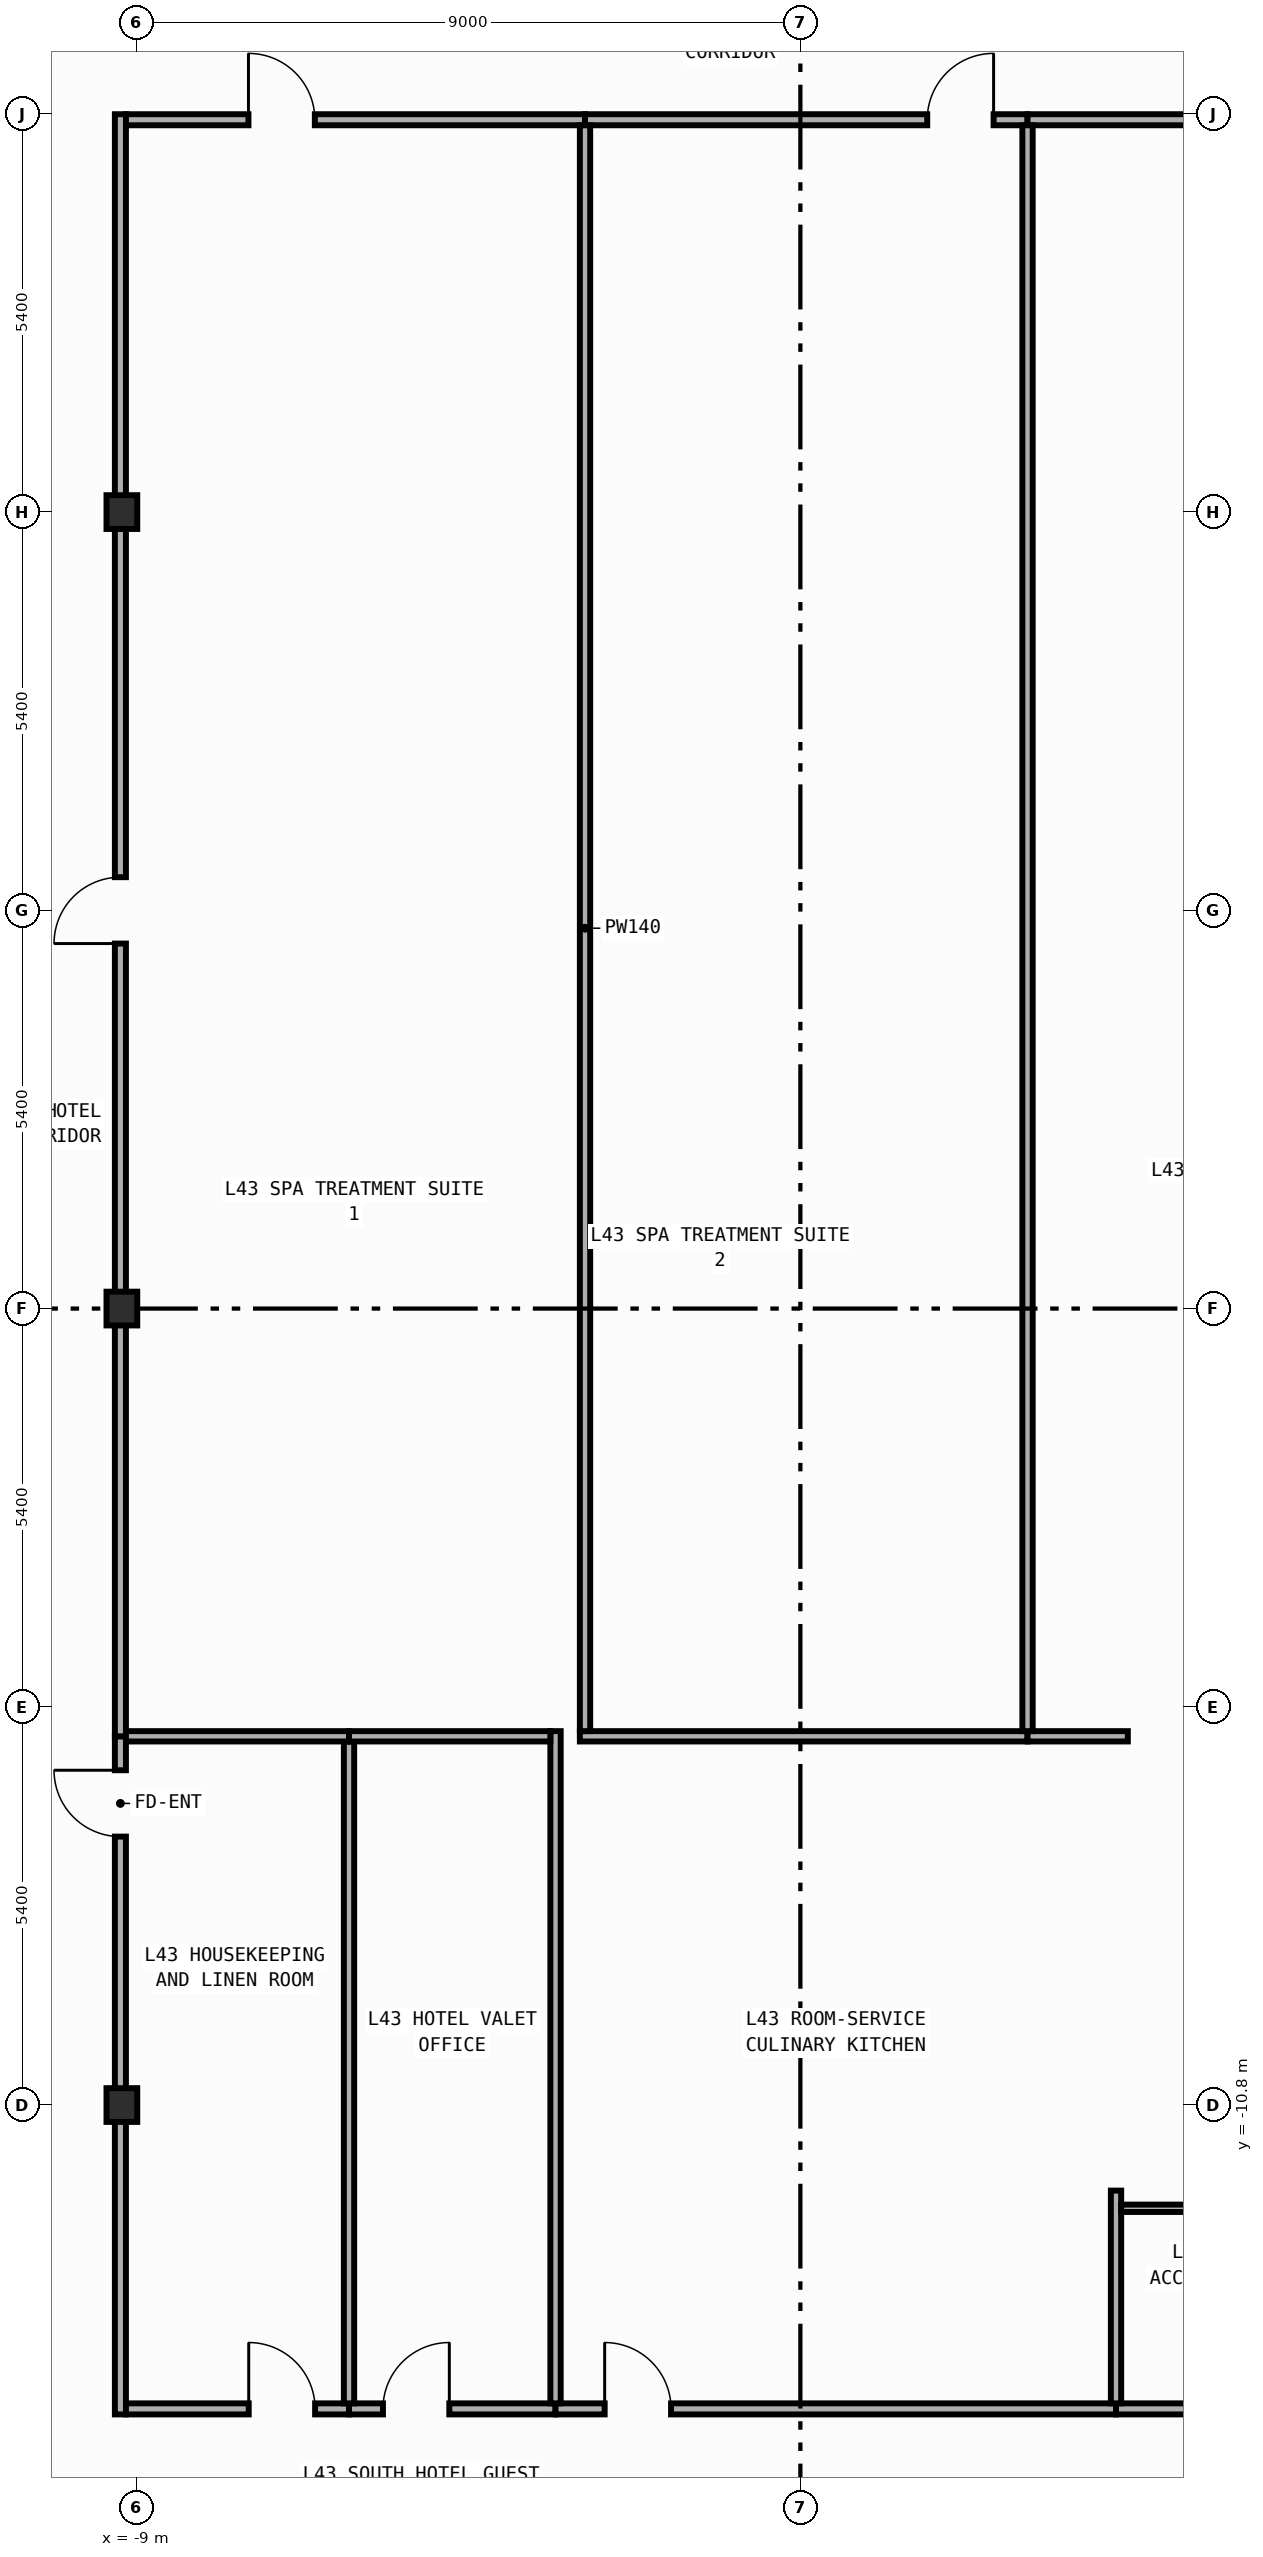
"""IFC4 building model, lengths in metres.
Left out: names, types, materials, properties, quantities, classifications, styles, units other than length and angle.
Written with IfcOpenShell. Run it as: python <this file> out.ifc"""

import sys

from ifc_helpers import new_model, si_unit, direction, frame, frame_2d, origin, origin_2d, place, context, subcontext, project, spatial, rectangle, i_section, extrude, element, fill, save


model = new_model("IFC4")
c1 = context("Model", 3, precision=1e-05, world=origin(), true_north=direction((0.0, 1.0)))
c2 = subcontext(c1, "Body", "Model", "MODEL_VIEW")
j1 = project(units=[si_unit("LENGTHUNIT", "METRE"), si_unit("PLANEANGLEUNIT", "RADIAN")], contexts=[c1])
p1 = place(None, origin())
s1 = spatial("IfcSite", under=j1, at=p1, CompositionType="ELEMENT")
p2 = place(p1, origin())
s2 = spatial("IfcBuilding", under=s1, at=p2, CompositionType="ELEMENT")
p3 = place(p2, frame((0.0, 0.0, 187.8)))
s3 = spatial("IfcBuildingStorey", under=s2, at=p3, CompositionType="ELEMENT", Elevation=187.8)
for number, where, z_axis, x_axis in (
    (1, (-9.2, -10.8, 0.0), (0.0, 0.0, 1.0), (1.0, 0.0, 0.0)),
    (2, (-9.2, 0.0, 0.0), (0.0, 0.0, 1.0), (1.0, 0.0, 0.0)),
    (3, (-9.2, 10.8, 0.0), (0.0, 0.0, 1.0), (1.0, 0.0, 0.0)),
):
    element("IfcColumn", number, at=place(p3, frame(where, z_axis=z_axis, x_axis=x_axis)), inside=s3, PredefinedType="COLUMN", context=c2, shape_type="SweptSolid", body=[
        extrude(i_section(OverallWidth=0.417, OverallDepth=0.458, WebThickness=0.03, FlangeThickness=0.05, FilletRadius=0.022, at=origin_2d()), origin(), (0.0, 0.0, 1.0), 3.8),
    ])
p4 = place(p3, frame((-9.22, -14.995, 0.0), z_axis=(0.0, 0.0, 1.0), x_axis=(0.0, 1.0, 0.0)))
e4 = element("IfcWall", 4, at=p4, inside=s3, PredefinedType="PARTITIONING", context=c2, shape_type="SweptSolid", body=[
    extrude(rectangle(XDim=9.195, YDim=0.15, at=frame_2d((4.598, 0.0))), origin(), (0.0, 0.0, 1.0), 2.952),
])
p5 = place(p4, frame((7.835, 0.0, 0.0)))
e5 = element("IfcOpeningElement", 5, at=p5, cuts=e4, PredefinedType="OPENING", context=c2, shape_type="SweptSolid", body=[
    extrude(rectangle(XDim=0.9, YDim=2.15, at=frame_2d((0.45, 1.075))), frame((0.0, 0.085, 0.0), z_axis=(0.0, -1.0, 0.0), x_axis=(1.0, 0.0, 0.0)), (0.0, 0.0, 1.0), 0.17),
])
p6 = place(p3, frame((-9.22, -5.8, 0.0), z_axis=(0.0, 0.0, 1.0), x_axis=(0.0, 1.0, 0.0)))
e6 = element("IfcWall", 6, at=p6, inside=s3, PredefinedType="PARTITIONING", context=c2, shape_type="SweptSolid", body=[
    extrude(rectangle(XDim=21.995, YDim=0.15, at=frame_2d((10.998, 0.0))), origin(), (0.0, 0.0, 1.0), 2.952),
])
p7 = place(p6, frame((10.749, 0.0, 0.0)))
e7 = element("IfcOpeningElement", 7, at=p7, cuts=e6, PredefinedType="OPENING", context=c2, shape_type="SweptSolid", body=[
    extrude(rectangle(XDim=0.9, YDim=2.15, at=frame_2d((0.45, 1.075))), frame((0.0, 0.085, 0.0), z_axis=(0.0, -1.0, 0.0), x_axis=(1.0, 0.0, 0.0)), (0.0, 0.0, 1.0), 0.17),
])
p8 = place(p3, frame((-9.145, 16.12, 0.0), z_axis=(0.0, 0.0, 1.0), x_axis=(1.0, 0.0, 0.0)))
e8 = element("IfcWall", 8, at=p8, inside=s3, PredefinedType="PARTITIONING", context=c2, shape_type="SweptSolid", body=[
    extrude(rectangle(XDim=6.225, YDim=0.15, at=frame_2d((3.113, 0.0))), origin(), (0.0, 0.0, 1.0), 3.54),
])
p9 = place(p8, frame((1.661, 0.0, 0.0)))
e9 = element("IfcOpeningElement", 9, at=p9, cuts=e8, PredefinedType="OPENING", context=c2, shape_type="SweptSolid", body=[
    extrude(rectangle(XDim=0.9, YDim=2.15, at=frame_2d((0.45, 1.075))), frame((0.0, 0.085, 0.0), z_axis=(0.0, -1.0, 0.0), x_axis=(1.0, 0.0, 0.0)), (0.0, 0.0, 1.0), 0.17),
])
p10 = place(p3, frame((-2.92, 16.12, 0.0), z_axis=(0.0, 0.0, 1.0), x_axis=(1.0, 0.0, 0.0)))
e10 = element("IfcWall", 10, at=p10, inside=s3, PredefinedType="PARTITIONING", context=c2, shape_type="SweptSolid", body=[
    extrude(rectangle(XDim=6.0, YDim=0.15, at=frame_2d((3.0, 0.0))), origin(), (0.0, 0.0, 1.0), 3.54),
])
p11 = place(p10, frame((4.64, 0.0, 0.0)))
e11 = element("IfcOpeningElement", 11, at=p11, cuts=e10, PredefinedType="OPENING", context=c2, shape_type="SweptSolid", body=[
    extrude(rectangle(XDim=0.9, YDim=2.15, at=frame_2d((0.45, 1.075))), frame((0.0, 0.085, 0.0), z_axis=(0.0, -1.0, 0.0), x_axis=(1.0, 0.0, 0.0)), (0.0, 0.0, 1.0), 0.17),
])
p12 = place(p3, frame((3.08, 16.12, 0.0), z_axis=(0.0, 0.0, 1.0), x_axis=(1.0, 0.0, 0.0)))
e12 = element("IfcWall", 12, at=p12, inside=s3, PredefinedType="PARTITIONING", context=c2, shape_type="SweptSolid", body=[
    extrude(rectangle(XDim=6.065, YDim=0.15, at=frame_2d((3.032, 0.0))), origin(), (0.0, 0.0, 1.0), 3.54),
])
p13 = place(p12, frame((3.492, 0.0, 0.0)))
e13 = element("IfcOpeningElement", 13, at=p13, cuts=e12, PredefinedType="OPENING", context=c2, shape_type="SweptSolid", body=[
    extrude(rectangle(XDim=0.9, YDim=2.15, at=frame_2d((0.45, 1.075))), frame((0.0, 0.085, 0.0), z_axis=(0.0, -1.0, 0.0), x_axis=(1.0, 0.0, 0.0)), (0.0, 0.0, 1.0), 0.17),
])
p14 = place(p3, frame((-9.145, -14.92, 0.0), z_axis=(0.0, 0.0, 1.0), x_axis=(1.0, 0.0, 0.0)))
e14 = element("IfcWall", 14, at=p14, inside=s3, PredefinedType="PARTITIONING", context=c2, shape_type="SweptSolid", body=[
    extrude(rectangle(XDim=3.025, YDim=0.15, at=frame_2d((1.512, 0.0))), origin(), (0.0, 0.0, 1.0), 3.54),
])
p15 = place(p14, frame((1.665, 0.0, 0.0)))
e15 = element("IfcOpeningElement", 15, at=p15, cuts=e14, PredefinedType="OPENING", context=c2, shape_type="SweptSolid", body=[
    extrude(rectangle(XDim=0.9, YDim=2.15, at=frame_2d((0.45, 1.075))), frame((0.0, 0.085, 0.0), z_axis=(0.0, -1.0, 0.0), x_axis=(1.0, 0.0, 0.0)), (0.0, 0.0, 1.0), 0.17),
])
p16 = place(p3, frame((-6.12, -14.92, 0.0), z_axis=(0.0, 0.0, 1.0), x_axis=(1.0, 0.0, 0.0)))
e16 = element("IfcWall", 16, at=p16, inside=s3, PredefinedType="PARTITIONING", context=c2, shape_type="SweptSolid", body=[
    extrude(rectangle(XDim=2.8, YDim=0.15, at=frame_2d((1.4, 0.0))), origin(), (0.0, 0.0, 1.0), 3.54),
])
p17 = place(p16, frame((0.46, 0.0, 0.0)))
e17 = element("IfcOpeningElement", 17, at=p17, cuts=e16, PredefinedType="OPENING", context=c2, shape_type="SweptSolid", body=[
    extrude(rectangle(XDim=0.9, YDim=2.15, at=frame_2d((0.45, 1.075))), frame((0.0, 0.085, 0.0), z_axis=(0.0, -1.0, 0.0), x_axis=(1.0, 0.0, 0.0)), (0.0, 0.0, 1.0), 0.17),
])
p18 = place(p3, frame((-3.32, -14.92, 0.0), z_axis=(0.0, 0.0, 1.0), x_axis=(1.0, 0.0, 0.0)))
e18 = element("IfcWall", 18, at=p18, inside=s3, PredefinedType="PARTITIONING", context=c2, shape_type="SweptSolid", body=[
    extrude(rectangle(XDim=7.6, YDim=0.15, at=frame_2d((3.8, 0.0))), origin(), (0.0, 0.0, 1.0), 3.54),
])
p19 = place(p18, frame((0.667, 0.0, 0.0)))
e19 = element("IfcOpeningElement", 19, at=p19, cuts=e18, PredefinedType="OPENING", context=c2, shape_type="SweptSolid", body=[
    extrude(rectangle(XDim=0.9, YDim=2.15, at=frame_2d((0.45, 1.075))), frame((0.0, 0.085, 0.0), z_axis=(0.0, -1.0, 0.0), x_axis=(1.0, 0.0, 0.0)), (0.0, 0.0, 1.0), 0.17),
])
p20 = place(p3, frame((4.28, -14.92, 0.0), z_axis=(0.0, 0.0, 1.0), x_axis=(1.0, 0.0, 0.0)))
e20 = element("IfcWall", 20, at=p20, inside=s3, PredefinedType="PARTITIONING", context=c2, shape_type="SweptSolid", body=[
    extrude(rectangle(XDim=2.9, YDim=0.15, at=frame_2d((1.45, 0.0))), origin(), (0.0, 0.0, 1.0), 3.54),
])
p21 = place(p20, frame((1.54, 0.0, 0.0)))
e21 = element("IfcOpeningElement", 21, at=p21, cuts=e20, PredefinedType="OPENING", context=c2, shape_type="SweptSolid", body=[
    extrude(rectangle(XDim=0.9, YDim=2.15, at=frame_2d((0.45, 1.075))), frame((0.0, 0.085, 0.0), z_axis=(0.0, -1.0, 0.0), x_axis=(1.0, 0.0, 0.0)), (0.0, 0.0, 1.0), 0.17),
])
p22 = place(p3, frame((-6.12, -14.845, 0.0), z_axis=(0.0, 0.0, 1.0), x_axis=(0.0, 1.0, 0.0)))
e22 = element("IfcWall", 22, at=p22, inside=s3, PredefinedType="PARTITIONING", context=c2, shape_type="SweptSolid", body=[
    extrude(rectangle(XDim=8.975, YDim=0.14, at=frame_2d((4.487, 0.0))), origin(), (0.0, 0.0, 1.0), 3.54),
])
p23 = place(p3, frame((-9.145, -5.8, 0.0), z_axis=(0.0, 0.0, 1.0), x_axis=(1.0, 0.0, 0.0)))
e23 = element("IfcWall", 23, at=p23, inside=s3, PredefinedType="PARTITIONING", context=c2, shape_type="SweptSolid", body=[
    extrude(rectangle(XDim=3.025, YDim=0.14, at=frame_2d((1.512, 0.0))), origin(), (0.0, 0.0, 1.0), 3.54),
])
p24 = place(p3, frame((-3.32, -14.845, 0.0), z_axis=(0.0, 0.0, 1.0), x_axis=(0.0, 1.0, 0.0)))
e24 = element("IfcWall", 24, at=p24, inside=s3, PredefinedType="PARTITIONING", context=c2, shape_type="SweptSolid", body=[
    extrude(rectangle(XDim=9.115, YDim=0.14, at=frame_2d((4.558, 0.0))), origin(), (0.0, 0.0, 1.0), 3.54),
])
p25 = place(p3, frame((-6.12, -5.8, 0.0), z_axis=(0.0, 0.0, 1.0), x_axis=(1.0, 0.0, 0.0)))
e25 = element("IfcWall", 25, at=p25, inside=s3, PredefinedType="PARTITIONING", context=c2, shape_type="SweptSolid", body=[
    extrude(rectangle(XDim=2.73, YDim=0.14, at=frame_2d((1.365, 0.0))), origin(), (0.0, 0.0, 1.0), 3.54),
])
p26 = place(p3, frame((4.28, -14.845, 0.0), z_axis=(0.0, 0.0, 1.0), x_axis=(0.0, 1.0, 0.0)))
e26 = element("IfcWall", 26, at=p26, inside=s3, PredefinedType="PARTITIONING", context=c2, shape_type="SweptSolid", body=[
    extrude(rectangle(XDim=2.885, YDim=0.14, at=frame_2d((1.442, 0.0))), origin(), (0.0, 0.0, 1.0), 3.54),
])
p27 = place(p3, frame((-2.99, -5.8, 0.0), z_axis=(0.0, 0.0, 1.0), x_axis=(1.0, 0.0, 0.0)))
e27 = element("IfcWall", 27, at=p27, inside=s3, PredefinedType="PARTITIONING", context=c2, shape_type="SweptSolid", body=[
    extrude(rectangle(XDim=6.07, YDim=0.14, at=frame_2d((3.035, 0.0))), origin(), (0.0, 0.0, 1.0), 3.54),
])
p28 = place(p3, frame((3.08, -5.8, 0.0), z_axis=(0.0, 0.0, 1.0), x_axis=(1.0, 0.0, 0.0)))
e28 = element("IfcWall", 28, at=p28, inside=s3, PredefinedType="PARTITIONING", context=c2, shape_type="SweptSolid", body=[
    extrude(rectangle(XDim=1.36, YDim=0.14, at=frame_2d((0.68, 0.0))), origin(), (0.0, 0.0, 1.0), 3.54),
])
for number, where, z_axis, x_axis in (
    (29, (-2.92, -5.73, 0.0), (0.0, 0.0, 1.0), (0.0, 1.0, 0.0)),
    (30, (3.08, -5.73, 0.0), (0.0, 0.0, 1.0), (0.0, 1.0, 0.0)),
):
    element("IfcWall", number, at=place(p3, frame(where, z_axis=z_axis, x_axis=x_axis)), inside=s3, PredefinedType="PARTITIONING", context=c2, shape_type="SweptSolid", body=[
        extrude(rectangle(XDim=21.775, YDim=0.14, at=frame_2d((10.887, 0.0))), origin(), (0.0, 0.0, 1.0), 3.54),
    ])
p29 = place(p3, frame((4.35, -12.2, 0.0), z_axis=(0.0, 0.0, 1.0), x_axis=(1.0, 0.0, 0.0)))
e31 = element("IfcWall", 31, at=p29, inside=s3, PredefinedType="PARTITIONING", context=c2, shape_type="SweptSolid", body=[
    extrude(rectangle(XDim=2.76, YDim=0.1, at=frame_2d((1.38, 0.0))), origin(), (0.0, 0.0, 1.0), 3.54),
])
p30 = place(p5, origin())
e32 = element("IfcDoor", 32, at=p30, inside=s3, OperationType="SINGLE_SWING_RIGHT", PredefinedType="DOOR", context=c2, shape_type="SweptSolid", body=[
    extrude(rectangle(XDim=0.9, YDim=2.15, at=frame_2d((0.45, 1.075))), frame((0.0, 0.025, 0.0), z_axis=(0.0, -1.0, 0.0), x_axis=(1.0, 0.0, 0.0)), (0.0, 0.0, 1.0), 0.05),
])
fill(e5, e32)
p31 = place(p7, origin())
e33 = element("IfcDoor", 33, at=p31, inside=s3, OperationType="SINGLE_SWING_LEFT", PredefinedType="DOOR", context=c2, shape_type="SweptSolid", body=[
    extrude(rectangle(XDim=0.9, YDim=2.15, at=frame_2d((0.45, 1.075))), frame((0.0, 0.025, 0.0), z_axis=(0.0, -1.0, 0.0), x_axis=(1.0, 0.0, 0.0)), (0.0, 0.0, 1.0), 0.05),
])
fill(e7, e33)
p32 = place(p9, origin())
e34 = element("IfcDoor", 34, at=p32, inside=s3, OperationType="SINGLE_SWING_LEFT", PredefinedType="DOOR", context=c2, shape_type="SweptSolid", body=[
    extrude(rectangle(XDim=0.9, YDim=2.15, at=frame_2d((0.45, 1.075))), frame((0.0, 0.025, 0.0), z_axis=(0.0, -1.0, 0.0), x_axis=(1.0, 0.0, 0.0)), (0.0, 0.0, 1.0), 0.05),
])
fill(e9, e34)
p33 = place(p11, origin())
e35 = element("IfcDoor", 35, at=p33, inside=s3, OperationType="SINGLE_SWING_RIGHT", PredefinedType="DOOR", context=c2, shape_type="SweptSolid", body=[
    extrude(rectangle(XDim=0.9, YDim=2.15, at=frame_2d((0.45, 1.075))), frame((0.0, 0.025, 0.0), z_axis=(0.0, -1.0, 0.0), x_axis=(1.0, 0.0, 0.0)), (0.0, 0.0, 1.0), 0.05),
])
fill(e11, e35)
p34 = place(p15, origin())
e36 = element("IfcDoor", 36, at=p34, inside=s3, OperationType="SINGLE_SWING_LEFT", PredefinedType="DOOR", context=c2, shape_type="SweptSolid", body=[
    extrude(rectangle(XDim=0.9, YDim=2.15, at=frame_2d((0.45, 1.075))), frame((0.0, 0.025, 0.0), z_axis=(0.0, -1.0, 0.0), x_axis=(1.0, 0.0, 0.0)), (0.0, 0.0, 1.0), 0.05),
])
fill(e15, e36)
p35 = place(p17, origin())
e37 = element("IfcDoor", 37, at=p35, inside=s3, OperationType="SINGLE_SWING_RIGHT", PredefinedType="DOOR", context=c2, shape_type="SweptSolid", body=[
    extrude(rectangle(XDim=0.9, YDim=2.15, at=frame_2d((0.45, 1.075))), frame((0.0, 0.025, 0.0), z_axis=(0.0, -1.0, 0.0), x_axis=(1.0, 0.0, 0.0)), (0.0, 0.0, 1.0), 0.05),
])
fill(e17, e37)
p36 = place(p19, origin())
e38 = element("IfcDoor", 38, at=p36, inside=s3, OperationType="SINGLE_SWING_LEFT", PredefinedType="DOOR", context=c2, shape_type="SweptSolid", body=[
    extrude(rectangle(XDim=0.9, YDim=2.15, at=frame_2d((0.45, 1.075))), frame((0.0, 0.025, 0.0), z_axis=(0.0, -1.0, 0.0), x_axis=(1.0, 0.0, 0.0)), (0.0, 0.0, 1.0), 0.05),
])
fill(e19, e38)
save(model, sys.argv[1])
